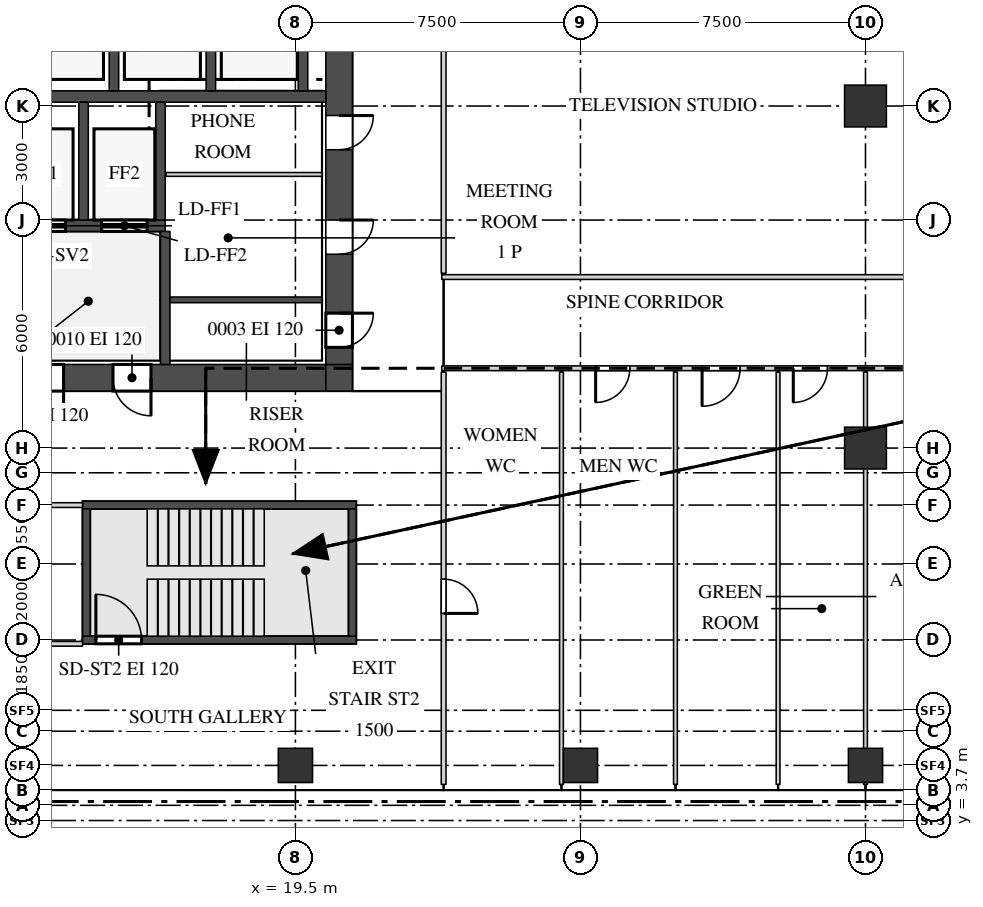
"""IFC4 building model, lengths in metres.
Left out: names, types, materials, properties, quantities, classifications, styles, units other than length and angle.
Written with IfcOpenShell. Run it as: python <this file> out.ifc"""

import sys

from ifc_helpers import new_model, si_unit, direction, frame, frame_2d, origin, origin_2d, place, context, subcontext, project, spatial, rectangle, extrude, source, transform, mapped, element, fill, save


model = new_model("IFC4")
c1 = context("Model", 3, precision=1e-05, world=origin(), true_north=direction((0.0, 1.0)))
c2 = subcontext(c1, "Body", "Model", "MODEL_VIEW")
j1 = project(units=[si_unit("LENGTHUNIT", "METRE"), si_unit("PLANEANGLEUNIT", "RADIAN")], contexts=[c1])
p1 = place(None, origin())
s1 = spatial("IfcSite", under=j1, at=p1, CompositionType="ELEMENT")
p2 = place(p1, origin())
s2 = spatial("IfcBuilding", under=s1, at=p2, CompositionType="ELEMENT")
p3 = place(p2, frame((0.0, 0.0, 246.2)))
s3 = spatial("IfcBuildingStorey", under=s2, at=p3, CompositionType="ELEMENT", Elevation=246.2)
m1 = source(origin(), c2, "Body", "SweptSolid", [
    extrude(rectangle(XDim=13.6, YDim=0.7, at=frame_2d((6.8, 0.0))), origin(), (0.0, 0.0, 1.0), 3.75),
])
p4 = place(p3, frame((6.7, 15.35, 0.0), z_axis=(0.0, 0.0, 1.0), x_axis=(1.0, 0.0, 0.0)))
e1 = element("IfcWall", 1, at=p4, inside=s3, PredefinedType="SHEAR", context=c2, shape_type="MappedRepresentation", body=[
    mapped(m1, transform((0.0, 0.0, 0.0))),
])
m2 = source(origin(), c2, "Body", "SweptSolid", [
    extrude(rectangle(XDim=1.2, YDim=2.1, at=frame_2d((0.6, 1.05))), frame((0.0, 0.36, 0.0), z_axis=(0.0, -1.0, 0.0), x_axis=(1.0, 0.0, 0.0)), (0.0, 0.0, 1.0), 0.72),
])
p5 = place(p4, frame((5.5, 0.0, 0.0)))
e2 = element("IfcOpeningElement", 2, at=p5, cuts=e1, PredefinedType="OPENING", context=c2, shape_type="MappedRepresentation", body=[
    mapped(m2, transform((0.0, 0.0, 0.0))),
])
p6 = place(p4, frame((2.15, 0.0, 0.0)))
e3 = element("IfcOpeningElement", 3, at=p6, cuts=e1, PredefinedType="OPENING", context=c2, shape_type="MappedRepresentation", body=[
    mapped(m2, transform((0.0, 0.0, 0.0))),
])
m3 = source(origin(), c2, "Body", "SweptSolid", [
    extrude(rectangle(XDim=1.0, YDim=2.1, at=frame_2d((0.5, 1.05))), frame((0.0, 0.36, 0.0), z_axis=(0.0, -1.0, 0.0), x_axis=(1.0, 0.0, 0.0)), (0.0, 0.0, 1.0), 0.72),
])
p7 = place(p4, frame((8.0, 0.0, 0.0)))
e4 = element("IfcOpeningElement", 4, at=p7, cuts=e1, PredefinedType="OPENING", context=c2, shape_type="MappedRepresentation", body=[
    mapped(m3, transform((0.0, 0.0, 0.0))),
])
m4 = source(origin(), c2, "Body", "SweptSolid", [
    extrude(rectangle(XDim=0.7, YDim=0.7, at=frame_2d((0.35, 0.0))), origin(), (0.0, 0.0, 1.0), 3.75),
])
p8 = place(p3, frame((20.3, 15.35, 0.0), z_axis=(0.0, 0.0, 1.0), x_axis=(1.0, 0.0, 0.0)))
e5 = element("IfcWall", 5, at=p8, inside=s3, PredefinedType="SHEAR", context=c2, shape_type="MappedRepresentation", body=[
    mapped(m4, transform((0.0, 0.0, 0.0))),
])
m5 = source(origin(), c2, "Body", "SweptSolid", [
    extrude(rectangle(XDim=22.6, YDim=0.7, at=frame_2d((11.3, 0.0))), origin(), (0.0, 0.0, 1.0), 3.75),
])
p9 = place(p3, frame((20.65, 15.7, 0.0), z_axis=(0.0, 0.0, 1.0), x_axis=(0.0, 1.0, 0.0)))
e6 = element("IfcWall", 6, at=p9, inside=s3, PredefinedType="SHEAR", context=c2, shape_type="MappedRepresentation", body=[
    mapped(m5, transform((0.0, 0.0, 0.0))),
])
m6 = source(origin(), c2, "Body", "SweptSolid", [
    extrude(rectangle(XDim=1.8, YDim=2.1, at=frame_2d((0.9, 1.05))), frame((0.0, 0.36, 0.0), z_axis=(0.0, -1.0, 0.0), x_axis=(1.0, 0.0, 0.0)), (0.0, 0.0, 1.0), 0.72),
])
p10 = place(p9, frame((10.8, 0.0, 0.0)))
e7 = element("IfcOpeningElement", 7, at=p10, cuts=e6, PredefinedType="OPENING", context=c2, shape_type="MappedRepresentation", body=[
    mapped(m6, transform((0.0, 0.0, 0.0))),
])
m7 = source(origin(), c2, "Body", "SweptSolid", [
    extrude(rectangle(XDim=0.9, YDim=2.1, at=frame_2d((0.45, 1.05))), frame((0.0, 0.36, 0.0), z_axis=(0.0, -1.0, 0.0), x_axis=(1.0, 0.0, 0.0)), (0.0, 0.0, 1.0), 0.72),
])
p11 = place(p9, frame((0.45, 0.0, 0.0)))
e8 = element("IfcOpeningElement", 8, at=p11, cuts=e6, PredefinedType="OPENING", context=c2, shape_type="MappedRepresentation", body=[
    mapped(m7, transform((0.0, 0.0, 0.0))),
])
p12 = place(p9, frame((2.9, 0.0, 0.0)))
e9 = element("IfcOpeningElement", 9, at=p12, cuts=e6, PredefinedType="OPENING", context=c2, shape_type="MappedRepresentation", body=[
    mapped(m7, transform((0.0, 0.0, 0.0))),
])
p13 = place(p9, frame((5.65, 0.0, 0.0)))
e10 = element("IfcOpeningElement", 10, at=p13, cuts=e6, PredefinedType="OPENING", context=c2, shape_type="MappedRepresentation", body=[
    mapped(m7, transform((0.0, 0.0, 0.0))),
])
m8 = source(origin(), c2, "Body", "SweptSolid", [
    extrude(rectangle(XDim=7.2, YDim=0.2, at=frame_2d((3.6, 0.0))), origin(), (0.0, 0.0, 1.0), 3.75),
])
p14 = place(p3, frame((13.9, 12.0, 0.0), z_axis=(0.0, 0.0, 1.0), x_axis=(1.0, 0.0, 0.0)))
e11 = element("IfcWall", 11, at=p14, inside=s3, PredefinedType="SHEAR", context=c2, shape_type="MappedRepresentation", body=[
    mapped(m8, transform((0.0, 0.0, 0.0))),
])
p15 = place(p3, frame((13.9, 8.45, 0.0), z_axis=(0.0, 0.0, 1.0), x_axis=(1.0, 0.0, 0.0)))
e12 = element("IfcWall", 12, at=p15, inside=s3, PredefinedType="SHEAR", context=c2, shape_type="MappedRepresentation", body=[
    mapped(m8, transform((0.0, 0.0, 0.0))),
])
m9 = source(origin(), c2, "Body", "SweptSolid", [
    extrude(rectangle(XDim=1.2, YDim=2.1, at=frame_2d((0.6, 1.05))), frame((0.0, 0.11, 0.0), z_axis=(0.0, -1.0, 0.0), x_axis=(1.0, 0.0, 0.0)), (0.0, 0.0, 1.0), 0.22),
])
p16 = place(p15, frame((0.35, 0.0, 0.0)))
e13 = element("IfcOpeningElement", 13, at=p16, cuts=e12, PredefinedType="OPENING", context=c2, shape_type="MappedRepresentation", body=[
    mapped(m9, transform((0.0, 0.0, 0.0))),
])
m10 = source(origin(), c2, "Body", "SweptSolid", [
    extrude(rectangle(XDim=3.35, YDim=0.2, at=frame_2d((1.675, 0.0))), origin(), (0.0, 0.0, 1.0), 3.75),
])
for number, where, z_axis, x_axis in (
    (14, (21.0, 8.55, 0.0), (0.0, 0.0, 1.0), (0.0, 1.0, 0.0)),
    (15, (14.0, 8.55, 0.0), (0.0, 0.0, 1.0), (0.0, 1.0, 0.0)),
):
    element("IfcWall", number, at=place(p3, frame(where, z_axis=z_axis, x_axis=x_axis)), inside=s3, PredefinedType="SHEAR", context=c2, shape_type="MappedRepresentation", body=[
        mapped(m10, transform((0.0, 0.0, 0.0))),
    ])
m11 = source(origin(), c2, "Body", "SweptSolid", [
    extrude(rectangle(XDim=13.6, YDim=0.3, at=frame_2d((6.8, 0.0))), origin(), (0.0, 0.0, 1.0), 3.75),
])
p17 = place(p3, frame((6.7, 22.75, 0.0), z_axis=(0.0, 0.0, 1.0), x_axis=(1.0, 0.0, 0.0)))
e16 = element("IfcWall", 16, at=p17, inside=s3, PredefinedType="STANDARD", context=c2, shape_type="MappedRepresentation", body=[
    mapped(m11, transform((0.0, 0.0, 0.0))),
])
m12 = source(origin(), c2, "Body", "SweptSolid", [
    extrude(rectangle(XDim=9.375, YDim=0.3, at=frame_2d((4.688, 0.0))), origin(), (0.0, 0.0, 1.0), 3.75),
])
p18 = place(p3, frame((6.7, 19.35, 0.0), z_axis=(0.0, 0.0, 1.0), x_axis=(1.0, 0.0, 0.0)))
e17 = element("IfcWall", 17, at=p18, inside=s3, PredefinedType="STANDARD", context=c2, shape_type="MappedRepresentation", body=[
    mapped(m12, transform((0.0, 0.0, 0.0))),
])
m13 = source(origin(), c2, "Body", "SweptSolid", [
    extrude(rectangle(XDim=1.2, YDim=2.1, at=frame_2d((0.6, 1.05))), frame((0.0, 0.16, 0.0), z_axis=(0.0, -1.0, 0.0), x_axis=(1.0, 0.0, 0.0)), (0.0, 0.0, 1.0), 0.32),
])
p19 = place(p18, frame((0.95, 0.0, 0.0)))
e18 = element("IfcOpeningElement", 18, at=p19, cuts=e17, PredefinedType="OPENING", context=c2, shape_type="MappedRepresentation", body=[
    mapped(m13, transform((0.0, 0.0, 0.0))),
])
p20 = place(p18, frame((3.3, 0.0, 0.0)))
e19 = element("IfcOpeningElement", 19, at=p20, cuts=e17, PredefinedType="OPENING", context=c2, shape_type="MappedRepresentation", body=[
    mapped(m13, transform((0.0, 0.0, 0.0))),
])
p21 = place(p18, frame((5.55, 0.0, 0.0)))
e20 = element("IfcOpeningElement", 20, at=p21, cuts=e17, PredefinedType="OPENING", context=c2, shape_type="MappedRepresentation", body=[
    mapped(m13, transform((0.0, 0.0, 0.0))),
])
p22 = place(p18, frame((7.7, 0.0, 0.0)))
e21 = element("IfcOpeningElement", 21, at=p22, cuts=e17, PredefinedType="OPENING", context=c2, shape_type="MappedRepresentation", body=[
    mapped(m13, transform((0.0, 0.0, 0.0))),
])
m14 = source(origin(), c2, "Body", "SweptSolid", [
    extrude(rectangle(XDim=3.1, YDim=0.25, at=frame_2d((1.55, 0.0))), origin(), (0.0, 0.0, 1.0), 3.75),
])
for number, where, z_axis, x_axis in (
    (22, (13.925, 19.5, 0.0), (0.0, 0.0, 1.0), (0.0, 1.0, 0.0)),
    (23, (15.95, 19.5, 0.0), (0.0, 0.0, 1.0), (0.0, 1.0, 0.0)),
):
    element("IfcWall", number, at=place(p3, frame(where, z_axis=z_axis, x_axis=x_axis)), inside=s3, PredefinedType="STANDARD", context=c2, shape_type="MappedRepresentation", body=[
        mapped(m14, transform((0.0, 0.0, 0.0))),
    ])
m15 = source(origin(), c2, "Body", "SweptSolid", [
    extrude(rectangle(XDim=2.4, YDim=0.25, at=frame_2d((1.2, 0.0))), origin(), (0.0, 0.0, 1.0), 3.75),
])
for number, where, z_axis, x_axis in (
    (24, (17.275, 22.9, 0.0), (0.0, 0.0, 1.0), (0.0, 1.0, 0.0)),
    (25, (19.7, 22.9, 0.0), (0.0, 0.0, 1.0), (0.0, 1.0, 0.0)),
    (26, (14.725, 22.9, 0.0), (0.0, 0.0, 1.0), (0.0, 1.0, 0.0)),
):
    element("IfcWall", number, at=place(p3, frame(where, z_axis=z_axis, x_axis=x_axis)), inside=s3, PredefinedType="STANDARD", context=c2, shape_type="MappedRepresentation", body=[
        mapped(m15, transform((0.0, 0.0, 0.0))),
    ])
m16 = source(origin(), c2, "Body", "SweptSolid", [
    extrude(rectangle(XDim=3.5, YDim=0.25, at=frame_2d((1.75, 0.0))), origin(), (0.0, 0.0, 1.0), 3.75),
])
p23 = place(p3, frame((16.075, 15.7, 0.0), z_axis=(0.0, 0.0, 1.0), x_axis=(0.0, 1.0, 0.0)))
e27 = element("IfcWall", 27, at=p23, inside=s3, PredefinedType="STANDARD", context=c2, shape_type="MappedRepresentation", body=[
    mapped(m16, transform((0.0, 0.0, 0.0))),
])
m17 = source(origin(), c2, "Body", "SweptSolid", [
    extrude(rectangle(XDim=0.9, YDim=0.9, at=origin_2d()), origin(), (0.0, 0.0, 1.0), 3.75),
])
for number, where, z_axis, x_axis in (
    (28, (19.5, 5.15, 0.0), (0.0, 0.0, 1.0), (1.0, 0.0, 0.0)),
    (29, (27.0, 5.15, 0.0), (0.0, 0.0, 1.0), (1.0, 0.0, 0.0)),
    (30, (34.5, 5.15, 0.0), (0.0, 0.0, 1.0), (1.0, 0.0, 0.0)),
):
    element("IfcColumn", number, at=place(p3, frame(where, z_axis=z_axis, x_axis=x_axis)), inside=s3, PredefinedType="COLUMN", context=c2, shape_type="MappedRepresentation", body=[
        mapped(m17, transform((0.0, 0.0, 0.0))),
    ])
m18 = source(origin(), c2, "Body", "SweptSolid", [
    extrude(rectangle(XDim=1.1, YDim=1.1, at=origin_2d()), origin(), (0.0, 0.0, 1.0), 3.75),
])
for number, where, z_axis, x_axis in (
    (31, (34.5, 13.5, 0.0), (0.0, 0.0, 1.0), (1.0, 0.0, 0.0)),
    (32, (34.5, 22.5, 0.0), (0.0, 0.0, 1.0), (1.0, 0.0, 0.0)),
):
    element("IfcColumn", number, at=place(p3, frame(where, z_axis=z_axis, x_axis=x_axis)), inside=s3, PredefinedType="COLUMN", context=c2, shape_type="MappedRepresentation", body=[
        mapped(m18, transform((0.0, 0.0, 0.0))),
    ])
m19 = source(origin(), c2, "Body", "SweptSolid", [
    extrude(rectangle(XDim=10.85, YDim=0.125, at=frame_2d((5.425, 0.0))), origin(), (0.0, 0.0, 1.0), 3.8),
])
p24 = place(p3, frame((23.4, 4.65, 0.0), z_axis=(0.0, 0.0, 1.0), x_axis=(0.0, 1.0, 0.0)))
e33 = element("IfcWall", 33, at=p24, inside=s3, PredefinedType="PARTITIONING", context=c2, shape_type="MappedRepresentation", body=[
    mapped(m19, transform((0.0, 0.0, 0.0))),
])
m20 = source(origin(), c2, "Body", "SweptSolid", [
    extrude(rectangle(XDim=0.9, YDim=2.1, at=frame_2d((0.45, 1.05))), frame((0.0, 0.073, 0.0), z_axis=(0.0, -1.0, 0.0), x_axis=(1.0, 0.0, 0.0)), (0.0, 0.0, 1.0), 0.145),
])
p25 = place(p24, frame((4.5, 0.0, 0.0)))
e34 = element("IfcOpeningElement", 34, at=p25, cuts=e33, PredefinedType="OPENING", context=c2, shape_type="MappedRepresentation", body=[
    mapped(m20, transform((0.0, 0.0, 0.0))),
])
m21 = source(origin(), c2, "Body", "SweptSolid", [
    extrude(rectangle(XDim=10.85, YDim=0.1, at=frame_2d((5.425, 0.0))), origin(), (0.0, 0.0, 1.0), 3.8),
])
for number, where, z_axis, x_axis in (
    (35, (26.5, 4.65, 0.0), (0.0, 0.0, 1.0), (0.0, 1.0, 0.0)),
    (36, (29.5, 4.65, 0.0), (0.0, 0.0, 1.0), (0.0, 1.0, 0.0)),
    (37, (32.2, 4.65, 0.0), (0.0, 0.0, 1.0), (0.0, 1.0, 0.0)),
):
    element("IfcWall", number, at=place(p3, frame(where, z_axis=z_axis, x_axis=x_axis)), inside=s3, PredefinedType="PARTITIONING", context=c2, shape_type="MappedRepresentation", body=[
        mapped(m21, transform((0.0, 0.0, 0.0))),
    ])
m22 = source(origin(), c2, "Body", "SweptSolid", [
    extrude(rectangle(XDim=10.85, YDim=0.1, at=frame_2d((5.425, 0.0))), origin(), (0.0, 0.0, 1.0), 3.35),
])
p26 = place(p3, frame((34.5, 4.65, 0.0), z_axis=(0.0, 0.0, 1.0), x_axis=(0.0, 1.0, 0.0)))
e38 = element("IfcWall", 38, at=p26, inside=s3, PredefinedType="PARTITIONING", context=c2, shape_type="MappedRepresentation", body=[
    mapped(m22, transform((0.0, 0.0, 0.0))),
])
m23 = source(origin(), c2, "Body", "SweptSolid", [
    extrude(rectangle(XDim=4.25, YDim=0.125, at=frame_2d((2.125, 0.0))), origin(), (0.0, 0.0, 1.0), 3.8),
])
p27 = place(p3, frame((9.65, 8.35, 0.0), z_axis=(0.0, 0.0, 1.0), x_axis=(1.0, 0.0, 0.0)))
e39 = element("IfcWall", 39, at=p27, inside=s3, PredefinedType="PARTITIONING", context=c2, shape_type="MappedRepresentation", body=[
    mapped(m23, transform((0.0, 0.0, 0.0))),
])
m24 = source(origin(), c2, "Body", "SweptSolid", [
    extrude(rectangle(XDim=9.25, YDim=0.125, at=frame_2d((4.625, 0.0))), origin(), (0.0, 0.0, 1.0), 3.8),
])
p28 = place(p3, frame((4.65, 12.0, 0.0), z_axis=(0.0, 0.0, 1.0), x_axis=(1.0, 0.0, 0.0)))
e40 = element("IfcWall", 40, at=p28, inside=s3, PredefinedType="PARTITIONING", context=c2, shape_type="MappedRepresentation", body=[
    mapped(m24, transform((0.0, 0.0, 0.0))),
])
p29 = place(p28, frame((3.6, 0.0, 0.0)))
e41 = element("IfcOpeningElement", 41, at=p29, cuts=e40, PredefinedType="OPENING", context=c2, shape_type="MappedRepresentation", body=[
    mapped(m20, transform((0.0, 0.0, 0.0))),
])
m25 = source(origin(), c2, "Body", "SweptSolid", [
    extrude(rectangle(XDim=26.0, YDim=0.125, at=frame_2d((13.0, 0.0))), origin(), (0.0, 0.0, 1.0), 3.8),
])
p30 = place(p3, frame((23.35, 15.6, 0.0), z_axis=(0.0, 0.0, 1.0), x_axis=(1.0, 0.0, 0.0)))
e42 = element("IfcWall", 42, at=p30, inside=s3, PredefinedType="PARTITIONING", context=c2, shape_type="MappedRepresentation", body=[
    mapped(m25, transform((0.0, 0.0, 0.0))),
])
p31 = place(p30, frame((4.05, 0.0, 0.0)))
e43 = element("IfcOpeningElement", 43, at=p31, cuts=e42, PredefinedType="OPENING", context=c2, shape_type="MappedRepresentation", body=[
    mapped(m20, transform((0.0, 0.0, 0.0))),
])
m26 = source(origin(), c2, "Body", "SweptSolid", [
    extrude(rectangle(XDim=1.0, YDim=2.1, at=frame_2d((0.5, 1.05))), frame((0.0, 0.073, 0.0), z_axis=(0.0, -1.0, 0.0), x_axis=(1.0, 0.0, 0.0)), (0.0, 0.0, 1.0), 0.145),
])
p32 = place(p30, frame((6.85, 0.0, 0.0)))
e44 = element("IfcOpeningElement", 44, at=p32, cuts=e42, PredefinedType="OPENING", context=c2, shape_type="MappedRepresentation", body=[
    mapped(m26, transform((0.0, 0.0, 0.0))),
])
p33 = place(p30, frame((9.25, 0.0, 0.0)))
e45 = element("IfcOpeningElement", 45, at=p33, cuts=e42, PredefinedType="OPENING", context=c2, shape_type="MappedRepresentation", body=[
    mapped(m20, transform((0.0, 0.0, 0.0))),
])
m27 = source(origin(), c2, "Body", "SweptSolid", [
    extrude(rectangle(XDim=1.2, YDim=2.1, at=frame_2d((0.6, 1.05))), frame((0.0, 0.073, 0.0), z_axis=(0.0, -1.0, 0.0), x_axis=(1.0, 0.0, 0.0)), (0.0, 0.0, 1.0), 0.145),
])
p34 = place(p30, frame((18.05, 0.0, 0.0)))
e46 = element("IfcOpeningElement", 46, at=p34, cuts=e42, PredefinedType="OPENING", context=c2, shape_type="MappedRepresentation", body=[
    mapped(m27, transform((0.0, 0.0, 0.0))),
])
m28 = source(origin(), c2, "Body", "SweptSolid", [
    extrude(rectangle(XDim=4.0, YDim=0.15, at=frame_2d((2.0, 0.0))), origin(), (0.0, 0.0, 1.0), 3.8),
])
p35 = place(p3, frame((16.2, 17.4, 0.0), z_axis=(0.0, 0.0, 1.0), x_axis=(1.0, 0.0, 0.0)))
e47 = element("IfcWall", 47, at=p35, inside=s3, PredefinedType="PARTITIONING", context=c2, shape_type="MappedRepresentation", body=[
    mapped(m28, transform((0.0, 0.0, 0.0))),
])
p36 = place(p3, frame((23.35, 18.0, 0.0), z_axis=(0.0, 0.0, 1.0), x_axis=(1.0, 0.0, 0.0)))
e48 = element("IfcWall", 48, at=p36, inside=s3, PredefinedType="PARTITIONING", context=c2, shape_type="MappedRepresentation", body=[
    mapped(m25, transform((0.0, 0.0, 0.0))),
])
p37 = place(p36, frame((12.5, 0.0, 0.0)))
e49 = element("IfcOpeningElement", 49, at=p37, cuts=e48, PredefinedType="OPENING", context=c2, shape_type="MappedRepresentation", body=[
    mapped(m27, transform((0.0, 0.0, 0.0))),
])
m29 = source(origin(), c2, "Body", "SweptSolid", [
    extrude(rectangle(XDim=20.8, YDim=0.125, at=frame_2d((10.4, 0.0))), origin(), (0.0, 0.0, 1.0), 3.8),
])
p38 = place(p3, frame((23.4, 18.1, 0.0), z_axis=(0.0, 0.0, 1.0), x_axis=(0.0, 1.0, 0.0)))
e50 = element("IfcWall", 50, at=p38, inside=s3, PredefinedType="PARTITIONING", context=c2, shape_type="MappedRepresentation", body=[
    mapped(m29, transform((0.0, 0.0, 0.0))),
])
p39 = place(p38, frame((12.05, 0.0, 0.0)))
e51 = element("IfcOpeningElement", 51, at=p39, cuts=e50, PredefinedType="OPENING", context=c2, shape_type="MappedRepresentation", body=[
    mapped(m27, transform((0.0, 0.0, 0.0))),
])
m30 = source(origin(), c2, "Body", "SweptSolid", [
    extrude(rectangle(XDim=4.1, YDim=0.1, at=frame_2d((2.05, 0.0))), origin(), (0.0, 0.0, 1.0), 3.8),
])
p40 = place(p3, frame((16.1, 20.7, 0.0), z_axis=(0.0, 0.0, 1.0), x_axis=(1.0, 0.0, 0.0)))
e52 = element("IfcWall", 52, at=p40, inside=s3, PredefinedType="PARTITIONING", context=c2, shape_type="MappedRepresentation", body=[
    mapped(m30, transform((0.0, 0.0, 0.0))),
])
m31 = source(origin(), c2, "Body", "SweptSolid", [
    extrude(rectangle(XDim=0.9, YDim=2.1, at=frame_2d((0.45, 1.05))), frame((0.0, 0.3, 0.0), z_axis=(0.0, -1.0, 0.0), x_axis=(1.0, 0.0, 0.0)), (0.0, 0.0, 1.0), 0.6),
])
p41 = place(p11, origin())
e53 = element("IfcDoor", 53, at=p41, inside=s3, OperationType="SINGLE_SWING_RIGHT", PredefinedType="DOOR", context=c2, shape_type="MappedRepresentation", body=[
    mapped(m31, transform((0.0, 0.0, 0.0))),
])
fill(e8, e53)
p42 = place(p12, origin())
e54 = element("IfcDoor", 54, at=p42, inside=s3, OperationType="SINGLE_SWING_RIGHT", PredefinedType="DOOR", context=c2, shape_type="MappedRepresentation", body=[
    mapped(m31, transform((0.0, 0.0, 0.0))),
])
fill(e9, e54)
p43 = place(p13, origin())
e55 = element("IfcDoor", 55, at=p43, inside=s3, OperationType="SINGLE_SWING_RIGHT", PredefinedType="DOOR", context=c2, shape_type="MappedRepresentation", body=[
    mapped(m31, transform((0.0, 0.0, 0.0))),
])
fill(e10, e55)
m32 = source(origin(), c2, "Body", "SweptSolid", [
    extrude(rectangle(XDim=1.2, YDim=2.1, at=frame_2d((0.6, 1.05))), frame((0.0, 0.3, 0.0), z_axis=(0.0, -1.0, 0.0), x_axis=(1.0, 0.0, 0.0)), (0.0, 0.0, 1.0), 0.6),
])
p44 = place(p5, origin())
e56 = element("IfcDoor", 56, at=p44, inside=s3, OperationType="SINGLE_SWING_RIGHT", PredefinedType="DOOR", context=c2, shape_type="MappedRepresentation", body=[
    mapped(m32, transform((0.0, 0.0, 0.0))),
])
fill(e2, e56)
m33 = source(origin(), c2, "Body", "SweptSolid", [
    extrude(rectangle(XDim=1.0, YDim=2.1, at=frame_2d((0.5, 1.05))), frame((0.0, 0.3, 0.0), z_axis=(0.0, -1.0, 0.0), x_axis=(1.0, 0.0, 0.0)), (0.0, 0.0, 1.0), 0.6),
])
p45 = place(p7, origin())
e57 = element("IfcDoor", 57, at=p45, inside=s3, OperationType="SINGLE_SWING_RIGHT", PredefinedType="DOOR", context=c2, shape_type="MappedRepresentation", body=[
    mapped(m33, transform((0.0, 0.0, 0.0))),
])
fill(e4, e57)
m34 = source(origin(), c2, "Body", "SweptSolid", [
    extrude(rectangle(XDim=0.9, YDim=2.1, at=frame_2d((0.45, 1.05))), frame((0.0, 0.025, 0.0), z_axis=(0.0, -1.0, 0.0), x_axis=(1.0, 0.0, 0.0)), (0.0, 0.0, 1.0), 0.05),
])
p46 = place(p25, origin())
e58 = element("IfcDoor", 58, at=p46, inside=s3, OperationType="SINGLE_SWING_LEFT", PredefinedType="DOOR", context=c2, shape_type="MappedRepresentation", body=[
    mapped(m34, transform((0.0, 0.0, 0.0))),
])
fill(e34, e58)
p47 = place(p31, origin())
e59 = element("IfcDoor", 59, at=p47, inside=s3, OperationType="SINGLE_SWING_LEFT", PredefinedType="DOOR", context=c2, shape_type="MappedRepresentation", body=[
    mapped(m34, transform((0.0, 0.0, 0.0))),
])
fill(e43, e59)
m35 = source(origin(), c2, "Body", "SweptSolid", [
    extrude(rectangle(XDim=1.0, YDim=2.1, at=frame_2d((0.5, 1.05))), frame((0.0, 0.025, 0.0), z_axis=(0.0, -1.0, 0.0), x_axis=(1.0, 0.0, 0.0)), (0.0, 0.0, 1.0), 0.05),
])
p48 = place(p32, origin())
e60 = element("IfcDoor", 60, at=p48, inside=s3, OperationType="SINGLE_SWING_LEFT", PredefinedType="DOOR", context=c2, shape_type="MappedRepresentation", body=[
    mapped(m35, transform((0.0, 0.0, 0.0))),
])
fill(e44, e60)
p49 = place(p33, origin())
e61 = element("IfcDoor", 61, at=p49, inside=s3, OperationType="SINGLE_SWING_LEFT", PredefinedType="DOOR", context=c2, shape_type="MappedRepresentation", body=[
    mapped(m34, transform((0.0, 0.0, 0.0))),
])
fill(e45, e61)
m36 = source(origin(), c2, "Body", "SweptSolid", [
    extrude(rectangle(XDim=1.2, YDim=2.1, at=frame_2d((0.6, 1.05))), frame((0.0, 0.025, 0.0), z_axis=(0.0, -1.0, 0.0), x_axis=(1.0, 0.0, 0.0)), (0.0, 0.0, 1.0), 0.05),
])
p50 = place(p16, origin())
e62 = element("IfcDoor", 62, at=p50, inside=s3, OperationType="SINGLE_SWING_RIGHT", PredefinedType="DOOR", context=c2, shape_type="MappedRepresentation", body=[
    mapped(m36, transform((0.0, 0.0, 0.0))),
])
fill(e13, e62)
p51 = place(p21, origin())
e63 = element("IfcDoor", 63, at=p51, inside=s3, OperationType="DOUBLE_DOOR_SLIDING", PredefinedType="DOOR", context=c2, shape_type="MappedRepresentation", body=[
    mapped(m36, transform((0.0, 0.0, 0.0))),
])
fill(e20, e63)
p52 = place(p22, origin())
e64 = element("IfcDoor", 64, at=p52, inside=s3, OperationType="DOUBLE_DOOR_SLIDING", PredefinedType="DOOR", context=c2, shape_type="MappedRepresentation", body=[
    mapped(m36, transform((0.0, 0.0, 0.0))),
])
fill(e21, e64)
save(model, sys.argv[1])
